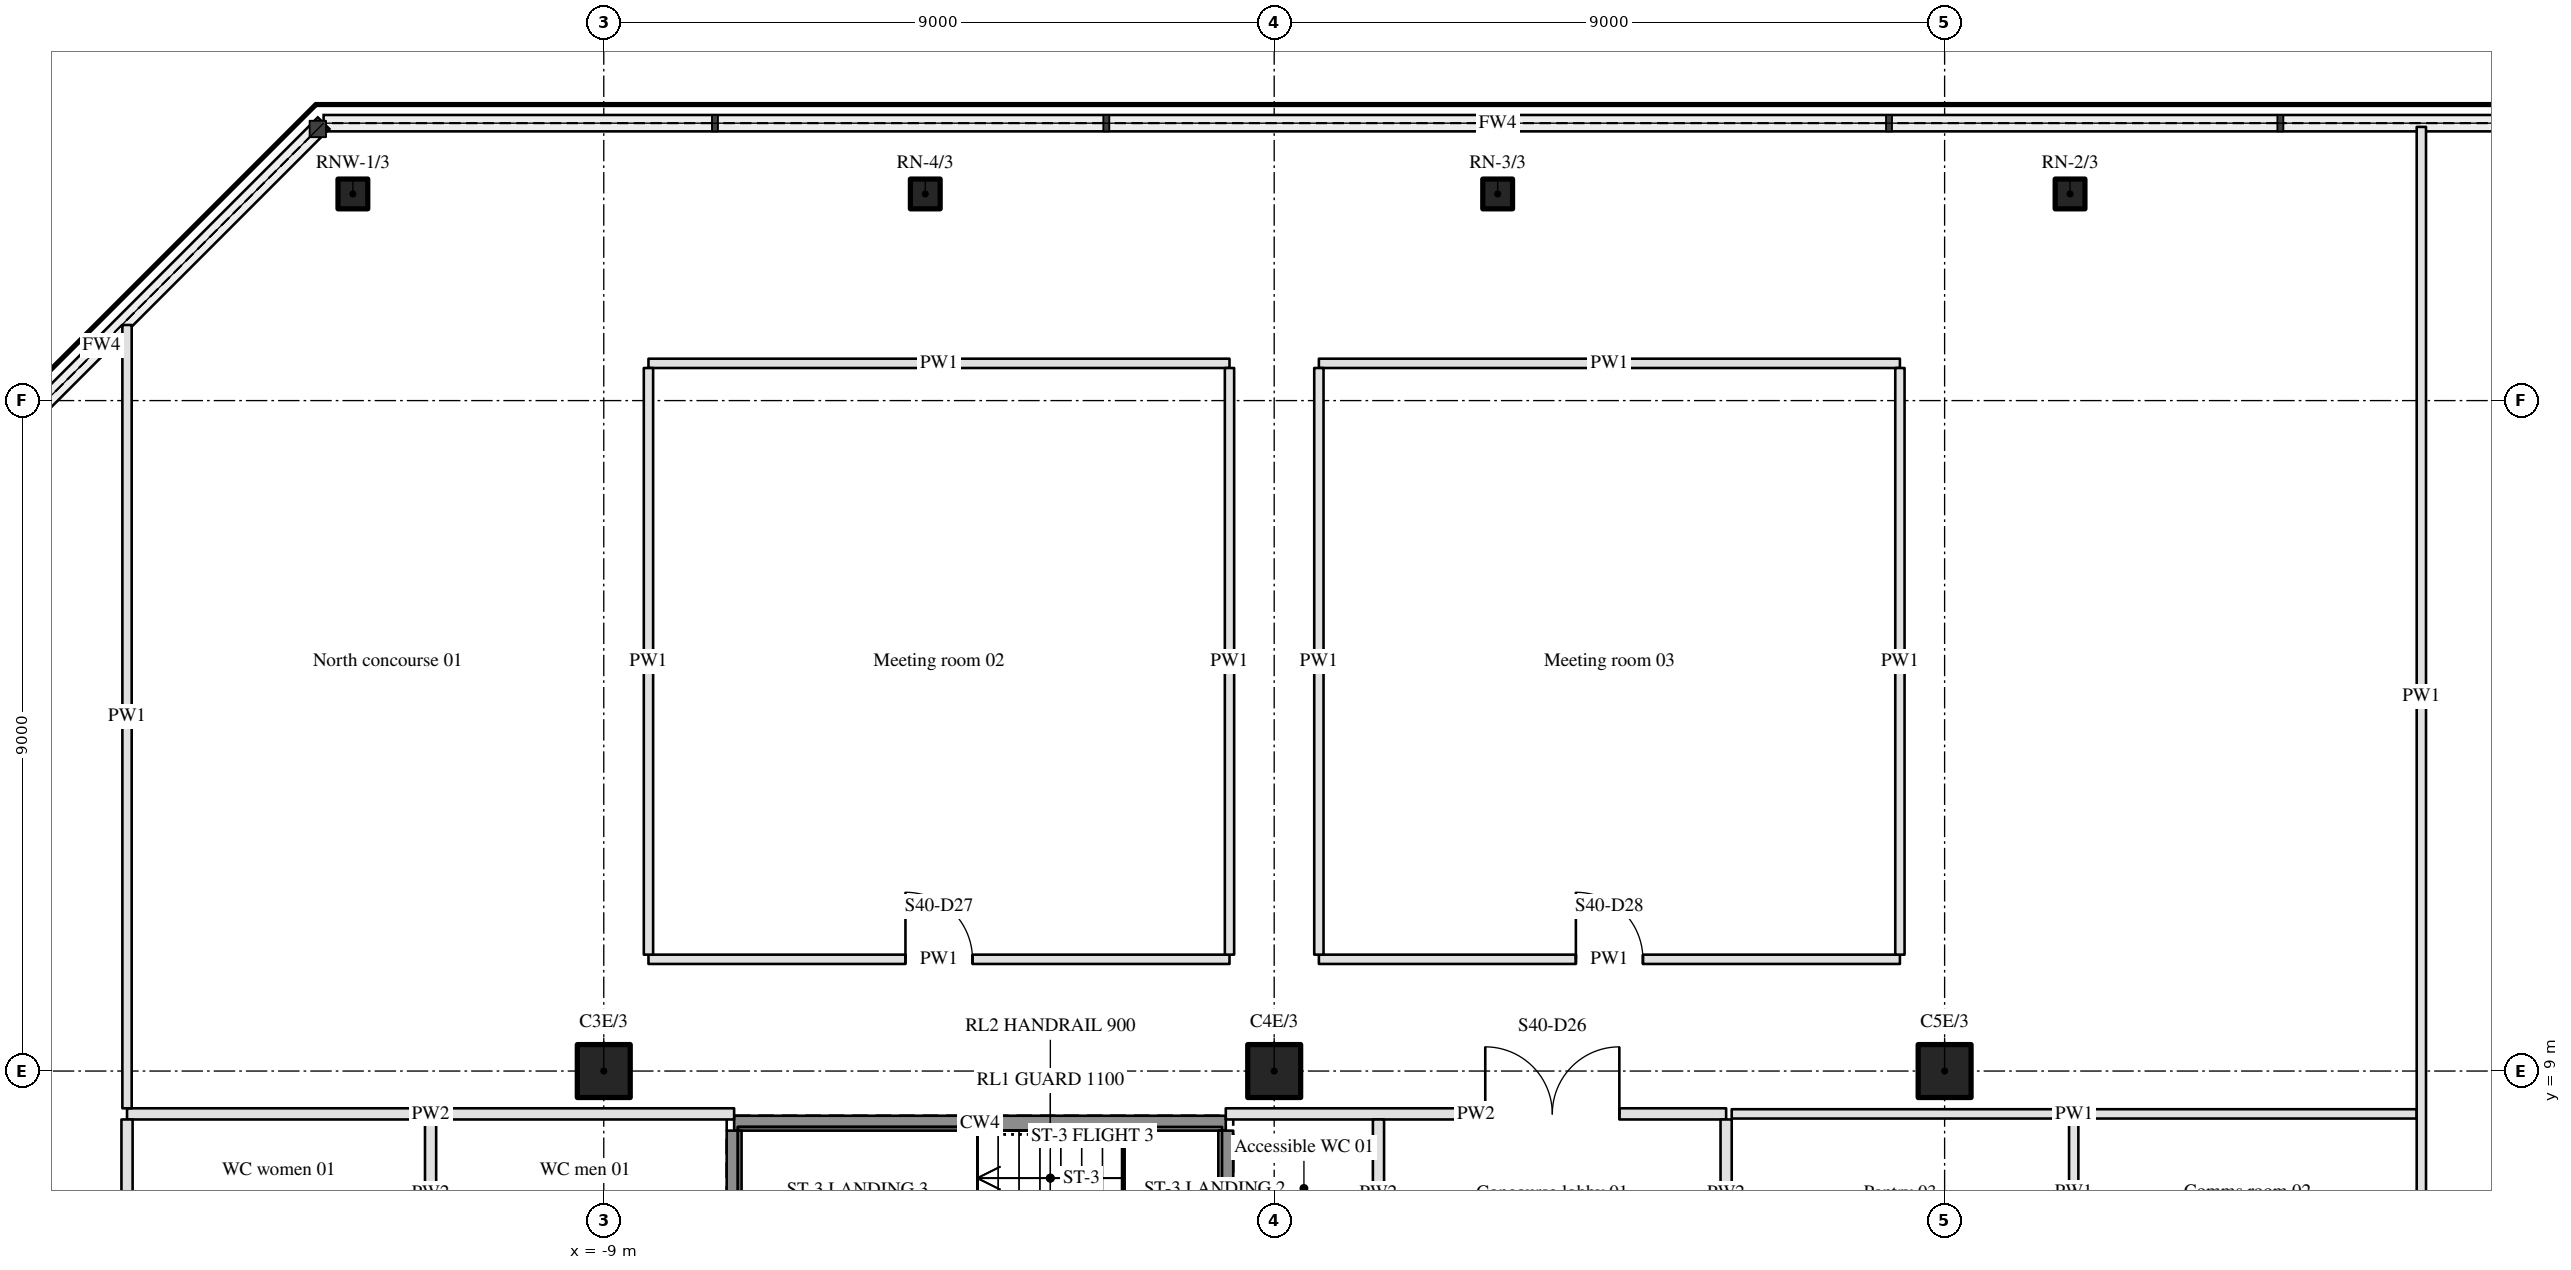
"""IFC4 building model, lengths in metres.
Left out: names, types, materials, properties, quantities, classifications, styles, units other than length and angle.
Written with IfcOpenShell. Run it as: python <this file> out.ifc"""

import sys

from ifc_helpers import new_model, si_unit, direction, frame, frame_2d, origin, origin_2d, place, context, subcontext, project, spatial, rectangle, hollow_rectangle, hollow_circle, extrude, element, fill, save


model = new_model("IFC4")
c1 = context("Model", 3, precision=1e-05, world=origin(), true_north=direction((0.0, 1.0)))
c2 = subcontext(c1, "Body", "Model", "MODEL_VIEW")
j1 = project(units=[si_unit("LENGTHUNIT", "METRE"), si_unit("PLANEANGLEUNIT", "RADIAN")], contexts=[c1])
p1 = place(None, origin())
s1 = spatial("IfcSite", under=j1, at=p1, CompositionType="ELEMENT")
p2 = place(p1, origin())
s2 = spatial("IfcBuilding", under=s1, at=p2, CompositionType="ELEMENT")
p3 = place(p2, frame((0.0, 0.0, 162.3)))
s3 = spatial("IfcBuildingStorey", under=s2, at=p3, CompositionType="ELEMENT", Elevation=162.3)
for number, where, z_axis, x_axis in (
    (1, (-9.0, 9.0, 0.0), (0.0, 0.0, 1.0), (1.0, 0.0, 0.0)),
    (2, (0.0, 9.0, 0.0), (0.0, 0.0, 1.0), (1.0, 0.0, 0.0)),
    (3, (9.0, 9.0, 0.0), (0.0, 0.0, 1.0), (1.0, 0.0, 0.0)),
):
    element("IfcColumn", number, at=place(p3, frame(where, z_axis=z_axis, x_axis=x_axis)), inside=s3, PredefinedType="COLUMN", context=c2, shape_type="SweptSolid", body=[
        extrude(hollow_circle(Radius=0.355, WallThickness=0.032, at=origin_2d()), origin(), (0.0, 0.0, 1.0), 5.4),
    ])
for number, where, z_axis, x_axis in (
    (4, (10.684, 20.774, 0.0), (0.0, 0.0, 1.0), (1.0, 0.0, 0.0)),
    (5, (3.0, 20.774, 0.0), (0.0, 0.0, 1.0), (1.0, 0.0, 0.0)),
    (6, (-4.684, 20.774, 0.0), (0.0, 0.0, 1.0), (1.0, 0.0, 0.0)),
    (7, (-12.368, 20.774, 0.0), (0.0, 0.0, 1.0), (1.0, 0.0, 0.0)),
):
    element("IfcColumn", number, at=place(p3, frame(where, z_axis=z_axis, x_axis=x_axis)), inside=s3, PredefinedType="COLUMN", context=c2, shape_type="SweptSolid", body=[
        extrude(hollow_rectangle(XDim=0.4, YDim=0.4, WallThickness=0.02, InnerFilletRadius=0.03, OuterFilletRadius=0.05, at=origin_2d()), origin(), (0.0, 0.0, 1.0), 5.4),
    ])
p4 = place(p3, frame((-7.25, 8.3, 0.0), z_axis=(0.0, 0.0, 1.0), x_axis=(1.0, 0.0, 0.0)))
e8 = element("IfcWall", 8, at=p4, inside=s3, PredefinedType="SHEAR", context=c2, shape_type="SweptSolid", body=[
    extrude(rectangle(XDim=6.6, YDim=0.2, at=frame_2d((3.3, 0.0))), origin(), (0.0, 0.0, 1.0), 5.4),
])
p5 = place(p3, frame((-15.4, 8.425, 0.0), z_axis=(0.0, 0.0, 1.0), x_axis=(1.0, 0.0, 0.0)))
e9 = element("IfcWall", 9, at=p5, inside=s3, PredefinedType="PARTITIONING", context=c2, shape_type="SweptSolid", body=[
    extrude(rectangle(XDim=8.15, YDim=0.15, at=frame_2d((4.075, 0.0))), origin(), (0.0, 0.0, 1.0), 4.46),
])
p6 = place(p3, frame((-0.65, 8.425, 0.0), z_axis=(0.0, 0.0, 1.0), x_axis=(1.0, 0.0, 0.0)))
e10 = element("IfcWall", 10, at=p6, inside=s3, PredefinedType="PARTITIONING", context=c2, shape_type="SweptSolid", body=[
    extrude(rectangle(XDim=6.717, YDim=0.15, at=frame_2d((3.358, 0.0))), origin(), (0.0, 0.0, 1.0), 4.46),
])
p7 = place(p6, frame((3.483, 0.0, 0.0)))
e11 = element("IfcOpeningElement", 11, at=p7, cuts=e10, PredefinedType="OPENING", context=c2, shape_type="SweptSolid", body=[
    extrude(rectangle(XDim=1.8, YDim=2.1, at=frame_2d((0.9, 1.05))), frame((0.0, 0.085, 0.0), z_axis=(0.0, -1.0, 0.0), x_axis=(1.0, 0.0, 0.0)), (0.0, 0.0, 1.0), 0.17),
])
p8 = place(p3, frame((6.142, 8.425, 0.0), z_axis=(0.0, 0.0, 1.0), x_axis=(1.0, 0.0, 0.0)))
e12 = element("IfcWall", 12, at=p8, inside=s3, PredefinedType="PARTITIONING", context=c2, shape_type="SweptSolid", body=[
    extrude(rectangle(XDim=9.195, YDim=0.125, at=frame_2d((4.598, 0.0))), origin(), (0.0, 0.0, 1.0), 4.46),
])
p9 = place(p3, frame((-8.4, 10.5, 0.0), z_axis=(0.0, 0.0, 1.0), x_axis=(1.0, 0.0, 0.0)))
e13 = element("IfcWall", 13, at=p9, inside=s3, PredefinedType="PARTITIONING", context=c2, shape_type="SweptSolid", body=[
    extrude(rectangle(XDim=7.8, YDim=0.125, at=frame_2d((3.9, 0.0))), origin(), (0.0, 0.0, 1.0), 4.46),
])
p10 = place(p9, frame((3.45, 0.0, 0.0)))
e14 = element("IfcOpeningElement", 14, at=p10, cuts=e13, PredefinedType="OPENING", context=c2, shape_type="SweptSolid", body=[
    extrude(rectangle(XDim=0.9, YDim=2.1, at=frame_2d((0.45, 1.05))), frame((0.0, 0.073, 0.0), z_axis=(0.0, -1.0, 0.0), x_axis=(1.0, 0.0, 0.0)), (0.0, 0.0, 1.0), 0.145),
])
p11 = place(p3, frame((0.6, 10.5, 0.0), z_axis=(0.0, 0.0, 1.0), x_axis=(1.0, 0.0, 0.0)))
e15 = element("IfcWall", 15, at=p11, inside=s3, PredefinedType="PARTITIONING", context=c2, shape_type="SweptSolid", body=[
    extrude(rectangle(XDim=7.8, YDim=0.125, at=frame_2d((3.9, 0.0))), origin(), (0.0, 0.0, 1.0), 4.46),
])
p12 = place(p11, frame((3.45, 0.0, 0.0)))
e16 = element("IfcOpeningElement", 16, at=p12, cuts=e15, PredefinedType="OPENING", context=c2, shape_type="SweptSolid", body=[
    extrude(rectangle(XDim=0.9, YDim=2.1, at=frame_2d((0.45, 1.05))), frame((0.0, 0.073, 0.0), z_axis=(0.0, -1.0, 0.0), x_axis=(1.0, 0.0, 0.0)), (0.0, 0.0, 1.0), 0.145),
])
for number, where, z_axis, x_axis in (
    (17, (-8.4, 18.5, 0.0), (0.0, 0.0, 1.0), (1.0, 0.0, 0.0)),
    (18, (0.6, 18.5, 0.0), (0.0, 0.0, 1.0), (1.0, 0.0, 0.0)),
):
    element("IfcWall", number, at=place(p3, frame(where, z_axis=z_axis, x_axis=x_axis)), inside=s3, PredefinedType="PARTITIONING", context=c2, shape_type="SweptSolid", body=[
        extrude(rectangle(XDim=7.8, YDim=0.125, at=frame_2d((3.9, 0.0))), origin(), (0.0, 0.0, 1.0), 4.46),
    ])
p13 = place(p3, frame((-15.4, 8.35, 0.0), z_axis=(0.0, 0.0, 1.0), x_axis=(0.0, -1.0, 0.0)))
e19 = element("IfcWall", 19, at=p13, inside=s3, PredefinedType="PARTITIONING", context=c2, shape_type="SweptSolid", body=[
    extrude(rectangle(XDim=23.175, YDim=0.15, at=frame_2d((11.587, 0.0))), origin(), (0.0, 0.0, 1.0), 4.46),
])
p14 = place(p13, frame((11.712, 0.0, 0.0)))
e20 = element("IfcOpeningElement", 20, at=p14, cuts=e19, PredefinedType="OPENING", context=c2, shape_type="SweptSolid", body=[
    extrude(rectangle(XDim=1.8, YDim=2.1, at=frame_2d((0.9, 1.05))), frame((0.0, 0.085, 0.0), z_axis=(0.0, -1.0, 0.0), x_axis=(1.0, 0.0, 0.0)), (0.0, 0.0, 1.0), 0.17),
])
p15 = place(p13, frame((9.613, 0.0, 0.0)))
e21 = element("IfcOpeningElement", 21, at=p15, cuts=e19, PredefinedType="OPENING", context=c2, shape_type="SweptSolid", body=[
    extrude(rectangle(XDim=1.8, YDim=2.1, at=frame_2d((0.9, 1.05))), frame((0.0, 0.085, 0.0), z_axis=(0.0, -1.0, 0.0), x_axis=(1.0, 0.0, 0.0)), (0.0, 0.0, 1.0), 0.17),
])
p16 = place(p3, frame((-15.4, 8.5, 0.0), z_axis=(0.0, 0.0, 1.0), x_axis=(0.0, 1.0, 0.0)))
e22 = element("IfcWall", 22, at=p16, inside=s3, PredefinedType="PARTITIONING", context=c2, shape_type="SweptSolid", body=[
    extrude(rectangle(XDim=10.515, YDim=0.125, at=frame_2d((5.257, 0.0))), origin(), (0.0, 0.0, 1.0), 4.46),
])
p17 = place(p3, frame((-11.325, 6.375, 0.0), z_axis=(0.0, 0.0, 1.0), x_axis=(0.0, 1.0, 0.0)))
e23 = element("IfcWall", 23, at=p17, inside=s3, PredefinedType="PARTITIONING", context=c2, shape_type="SweptSolid", body=[
    extrude(rectangle(XDim=1.975, YDim=0.15, at=frame_2d((0.988, 0.0))), origin(), (0.0, 0.0, 1.0), 4.46),
])
p18 = place(p3, frame((-8.4, 10.562, 0.0), z_axis=(0.0, 0.0, 1.0), x_axis=(0.0, 1.0, 0.0)))
e24 = element("IfcWall", 24, at=p18, inside=s3, PredefinedType="PARTITIONING", context=c2, shape_type="SweptSolid", body=[
    extrude(rectangle(XDim=7.875, YDim=0.125, at=frame_2d((3.938, 0.0))), origin(), (0.0, 0.0, 1.0), 4.46),
])
for number, where, z_axis, x_axis in (
    (25, (-7.25, 5.5, 0.0), (0.0, 0.0, 1.0), (0.0, 1.0, 0.0)),
    (26, (-0.65, 5.5, 0.0), (0.0, 0.0, 1.0), (0.0, 1.0, 0.0)),
):
    element("IfcWall", number, at=place(p3, frame(where, z_axis=z_axis, x_axis=x_axis)), inside=s3, PredefinedType="SHEAR", context=c2, shape_type="SweptSolid", body=[
        extrude(rectangle(XDim=2.7, YDim=0.2, at=frame_2d((1.35, 0.0))), origin(), (0.0, 0.0, 1.0), 5.4),
    ])
for number, where, z_axis, x_axis in (
    (27, (-0.6, 10.562, 0.0), (0.0, 0.0, 1.0), (0.0, 1.0, 0.0)),
    (28, (0.6, 10.562, 0.0), (0.0, 0.0, 1.0), (0.0, 1.0, 0.0)),
):
    element("IfcWall", number, at=place(p3, frame(where, z_axis=z_axis, x_axis=x_axis)), inside=s3, PredefinedType="PARTITIONING", context=c2, shape_type="SweptSolid", body=[
        extrude(rectangle(XDim=7.875, YDim=0.125, at=frame_2d((3.938, 0.0))), origin(), (0.0, 0.0, 1.0), 4.46),
    ])
for number, where, z_axis, x_axis in (
    (29, (1.4, 6.375, 0.0), (0.0, 0.0, 1.0), (0.0, 1.0, 0.0)),
    (30, (6.067, 6.375, 0.0), (0.0, 0.0, 1.0), (0.0, 1.0, 0.0)),
):
    element("IfcWall", number, at=place(p3, frame(where, z_axis=z_axis, x_axis=x_axis)), inside=s3, PredefinedType="PARTITIONING", context=c2, shape_type="SweptSolid", body=[
        extrude(rectangle(XDim=1.975, YDim=0.15, at=frame_2d((0.988, 0.0))), origin(), (0.0, 0.0, 1.0), 4.46),
    ])
p19 = place(p3, frame((8.4, 10.562, 0.0), z_axis=(0.0, 0.0, 1.0), x_axis=(0.0, 1.0, 0.0)))
e31 = element("IfcWall", 31, at=p19, inside=s3, PredefinedType="PARTITIONING", context=c2, shape_type="SweptSolid", body=[
    extrude(rectangle(XDim=7.875, YDim=0.125, at=frame_2d((3.938, 0.0))), origin(), (0.0, 0.0, 1.0), 4.46),
])
p20 = place(p3, frame((10.733, 6.375, 0.0), z_axis=(0.0, 0.0, 1.0), x_axis=(0.0, 1.0, 0.0)))
e32 = element("IfcWall", 32, at=p20, inside=s3, PredefinedType="PARTITIONING", context=c2, shape_type="SweptSolid", body=[
    extrude(rectangle(XDim=1.988, YDim=0.125, at=frame_2d((0.994, 0.0))), origin(), (0.0, 0.0, 1.0), 4.46),
])
p21 = place(p3, frame((15.4, 6.375, 0.0), z_axis=(0.0, 0.0, 1.0), x_axis=(0.0, 1.0, 0.0)))
e33 = element("IfcWall", 33, at=p21, inside=s3, PredefinedType="PARTITIONING", context=c2, shape_type="SweptSolid", body=[
    extrude(rectangle(XDim=15.299, YDim=0.125, at=frame_2d((7.649, 0.0))), origin(), (0.0, 0.0, 1.0), 4.46),
])
p22 = place(p7, origin())
e34 = element("IfcDoor", 34, at=p22, inside=s3, OperationType="DOUBLE_DOOR_SINGLE_SWING", PredefinedType="DOOR", context=c2, shape_type="SweptSolid", body=[
    extrude(rectangle(XDim=1.8, YDim=2.1, at=frame_2d((0.9, 1.05))), frame((0.0, 0.025, 0.0), z_axis=(0.0, -1.0, 0.0), x_axis=(1.0, 0.0, 0.0)), (0.0, 0.0, 1.0), 0.05),
])
fill(e11, e34)
p23 = place(p10, origin())
e35 = element("IfcDoor", 35, at=p23, inside=s3, OperationType="SINGLE_SWING_LEFT", PredefinedType="DOOR", context=c2, shape_type="SweptSolid", body=[
    extrude(rectangle(XDim=0.9, YDim=2.1, at=frame_2d((0.45, 1.05))), frame((0.0, 0.025, 0.0), z_axis=(0.0, -1.0, 0.0), x_axis=(1.0, 0.0, 0.0)), (0.0, 0.0, 1.0), 0.05),
])
fill(e14, e35)
p24 = place(p12, origin())
e36 = element("IfcDoor", 36, at=p24, inside=s3, OperationType="SINGLE_SWING_LEFT", PredefinedType="DOOR", context=c2, shape_type="SweptSolid", body=[
    extrude(rectangle(XDim=0.9, YDim=2.1, at=frame_2d((0.45, 1.05))), frame((0.0, 0.025, 0.0), z_axis=(0.0, -1.0, 0.0), x_axis=(1.0, 0.0, 0.0)), (0.0, 0.0, 1.0), 0.05),
])
fill(e16, e36)
save(model, sys.argv[1])
